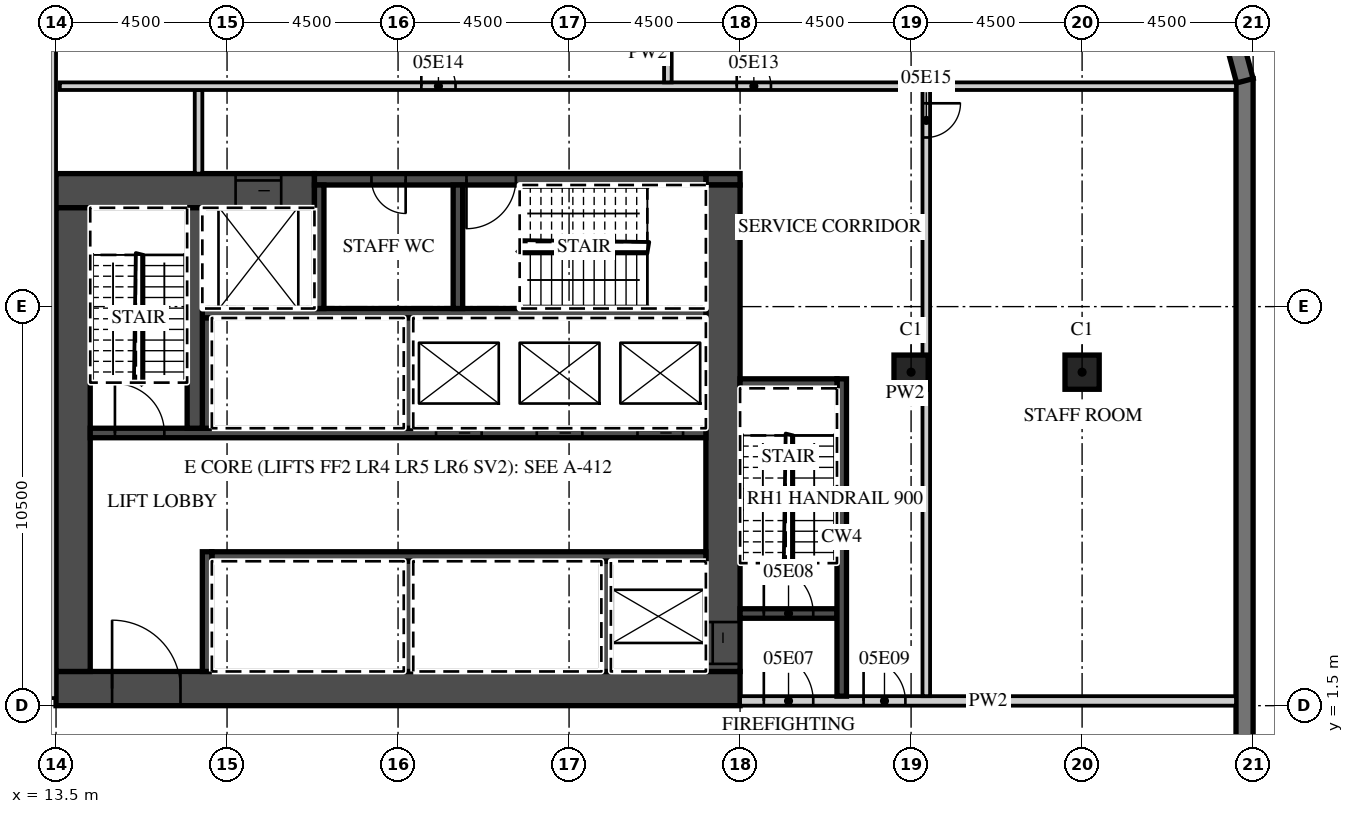
"""IFC4 building model, lengths in metres.
Left out: names, types, materials, properties, quantities, classifications, styles, units other than length and angle.
Written with IfcOpenShell. Run it as: python <this file> out.ifc"""

import sys

from ifc_helpers import new_model, si_unit, direction, frame, frame_2d, origin, origin_2d, place, context, subcontext, project, spatial, polyline, rectangle, outline, extrude, element, fill, save


model = new_model("IFC4")
c1 = context("Model", 3, precision=1e-05, world=origin(), true_north=direction((0.0, 1.0)))
c2 = subcontext(c1, "Body", "Model", "MODEL_VIEW")
j1 = project(units=[si_unit("LENGTHUNIT", "METRE"), si_unit("PLANEANGLEUNIT", "RADIAN")], contexts=[c1])
p1 = place(None, origin())
s1 = spatial("IfcSite", under=j1, at=p1, CompositionType="ELEMENT")
p2 = place(p1, origin())
s2 = spatial("IfcBuilding", under=s1, at=p2, CompositionType="ELEMENT")
p3 = place(p2, frame((0.0, 0.0, 33.5)))
s3 = spatial("IfcBuildingStorey", under=s2, at=p3, CompositionType="ELEMENT", Elevation=33.5)
for number, where, z_axis, x_axis in (
    (1, (36.0, 10.275, 0.0), (0.0, 0.0, 1.0), (1.0, 0.0, 0.0)),
    (2, (40.5, 10.275, 0.0), (0.0, 0.0, 1.0), (1.0, 0.0, 0.0)),
):
    element("IfcColumn", number, at=place(p3, frame(where, z_axis=z_axis, x_axis=x_axis)), inside=s3, PredefinedType="COLUMN", context=c2, shape_type="SweptSolid", body=[
        extrude(rectangle(XDim=0.9, YDim=0.9, at=origin_2d()), origin(), (0.0, 0.0, 1.0), 4.5),
    ])
p4 = place(p3, frame((44.775, -18.0, 0.0), z_axis=(0.0, 0.0, 1.0), x_axis=(0.0, 1.0, 0.0)))
e3 = element("IfcWall", 3, at=p4, inside=s3, PredefinedType="SOLIDWALL", context=c2, shape_type="SweptSolid", body=[
    extrude(rectangle(XDim=36.0, YDim=0.45, at=frame_2d((18.0, 0.0))), origin(), (0.0, 0.0, 1.0), 4.05),
])
p5 = place(p4, frame((4.05, 0.0, 0.9)))
e4 = element("IfcOpeningElement", 4, at=p5, cuts=e3, PredefinedType="OPENING", context=c2, shape_type="SweptSolid", body=[
    extrude(rectangle(XDim=3.0, YDim=1.8, at=frame_2d((1.5, 0.9))), frame((0.0, 0.235, 0.0), z_axis=(0.0, -1.0, 0.0), x_axis=(1.0, 0.0, 0.0)), (0.0, 0.0, 1.0), 0.47),
])
p6 = place(p3, frame((44.783, 17.942, 0.0), z_axis=(0.0, 0.0, 1.0), x_axis=(-0.25881466832, 0.965926999034, 0.0)))
e5 = element("IfcWall", 5, at=p6, inside=s3, PredefinedType="SOLIDWALL", context=c2, shape_type="SweptSolid", body=[
    extrude(outline(polyline([(0.0, -0.225), (2.071, -0.225), (1.95, 0.225), (0.121, 0.225), (0.0, -0.225)])), origin(), (0.0, 0.0, 1.0), 4.05),
])
p7 = place(p3, frame((13.5, 1.95, 0.0), z_axis=(0.0, 0.0, 1.0), x_axis=(1.0, 0.0, 0.0)))
e6 = element("IfcWall", 6, at=p7, inside=s3, PredefinedType="SHEAR", context=c2, shape_type="SweptSolid", body=[
    extrude(rectangle(XDim=18.0, YDim=0.9, at=frame_2d((9.0, 0.0))), origin(), (0.0, 0.0, 1.0), 4.05),
])
p8 = place(p7, frame((1.475, 0.0, 0.0)))
e7 = element("IfcOpeningElement", 7, at=p8, cuts=e6, PredefinedType="OPENING", context=c2, shape_type="SweptSolid", body=[
    extrude(rectangle(XDim=1.8, YDim=2.1, at=frame_2d((0.9, 1.05))), frame((0.0, 0.46, 0.0), z_axis=(0.0, -1.0, 0.0), x_axis=(1.0, 0.0, 0.0)), (0.0, 0.0, 1.0), 0.92),
])
p9 = place(p3, frame((13.5, 15.05, 0.0), z_axis=(0.0, 0.0, 1.0), x_axis=(1.0, 0.0, 0.0)))
e8 = element("IfcWall", 8, at=p9, inside=s3, PredefinedType="SHEAR", context=c2, shape_type="SweptSolid", body=[
    extrude(rectangle(XDim=6.8, YDim=0.9, at=frame_2d((3.4, 0.0))), origin(), (0.0, 0.0, 1.0), 4.05),
])
p10 = place(p9, frame((4.725, 0.0, 0.0)))
e9 = element("IfcOpeningElement", 9, at=p10, cuts=e8, PredefinedType="OPENING", context=c2, shape_type="SweptSolid", body=[
    extrude(rectangle(XDim=1.2, YDim=2.1, at=frame_2d((0.6, 1.05))), frame((0.0, 0.46, 0.0), z_axis=(0.0, -1.0, 0.0), x_axis=(1.0, 0.0, 0.0)), (0.0, 0.0, 1.0), 0.92),
])
p11 = place(p3, frame((30.6, 15.35, 0.0), z_axis=(0.0, 0.0, 1.0), x_axis=(1.0, 0.0, 0.0)))
e10 = element("IfcWall", 10, at=p11, inside=s3, PredefinedType="SHEAR", context=c2, shape_type="SweptSolid", body=[
    extrude(rectangle(XDim=0.9, YDim=0.3, at=frame_2d((0.45, 0.0))), origin(), (0.0, 0.0, 1.0), 4.05),
])
p12 = place(p3, frame((20.3, 15.35, 0.0), z_axis=(0.0, 0.0, 1.0), x_axis=(1.0, 0.0, 0.0)))
e11 = element("IfcWall", 11, at=p12, inside=s3, PredefinedType="SHEAR", context=c2, shape_type="SweptSolid", body=[
    extrude(rectangle(XDim=10.3, YDim=0.3, at=frame_2d((5.15, 0.0))), origin(), (0.0, 0.0, 1.0), 4.05),
])
p13 = place(p12, frame((4.0, 0.0, 0.0)))
e12 = element("IfcOpeningElement", 12, at=p13, cuts=e11, PredefinedType="OPENING", context=c2, shape_type="SweptSolid", body=[
    extrude(rectangle(XDim=1.3, YDim=2.1, at=frame_2d((0.65, 1.05))), frame((0.0, 0.16, 0.0), z_axis=(0.0, -1.0, 0.0), x_axis=(1.0, 0.0, 0.0)), (0.0, 0.0, 1.0), 0.32),
])
p14 = place(p12, frame((1.5, 0.0, 0.0)))
e13 = element("IfcOpeningElement", 13, at=p14, cuts=e11, PredefinedType="OPENING", context=c2, shape_type="SweptSolid", body=[
    extrude(rectangle(XDim=0.9, YDim=2.1, at=frame_2d((0.45, 1.05))), frame((0.0, 0.16, 0.0), z_axis=(0.0, -1.0, 0.0), x_axis=(1.0, 0.0, 0.0)), (0.0, 0.0, 1.0), 0.32),
])
p15 = place(p3, frame((31.05, 2.4, 0.0), z_axis=(0.0, 0.0, 1.0), x_axis=(0.0, 1.0, 0.0)))
e14 = element("IfcWall", 14, at=p15, inside=s3, PredefinedType="SHEAR", context=c2, shape_type="SweptSolid", body=[
    extrude(rectangle(XDim=12.8, YDim=0.9, at=frame_2d((6.4, 0.0))), origin(), (0.0, 0.0, 1.0), 4.05),
])
p16 = place(p15, frame((0.2, 0.0, 0.0)))
e15 = element("IfcOpeningElement", 15, at=p16, cuts=e14, PredefinedType="OPENING", context=c2, shape_type="SweptSolid", body=[
    extrude(rectangle(XDim=1.1, YDim=2.1, at=frame_2d((0.55, 1.05))), frame((0.0, 0.46, 0.0), z_axis=(0.0, -1.0, 0.0), x_axis=(1.0, 0.0, 0.0)), (0.0, 0.0, 1.0), 0.92),
])
p17 = place(p3, frame((13.95, 2.4, 0.0), z_axis=(0.0, 0.0, 1.0), x_axis=(0.0, 1.0, 0.0)))
e16 = element("IfcWall", 16, at=p17, inside=s3, PredefinedType="SHEAR", context=c2, shape_type="SweptSolid", body=[
    extrude(rectangle(XDim=12.2, YDim=0.9, at=frame_2d((6.1, 0.0))), origin(), (0.0, 0.0, 1.0), 4.05),
])
p18 = place(p3, frame((17.6, 5.425, 0.0), z_axis=(0.0, 0.0, 1.0), x_axis=(1.0, 0.0, 0.0)))
e17 = element("IfcWall", 17, at=p18, inside=s3, PredefinedType="SHEAR", context=c2, shape_type="SweptSolid", body=[
    extrude(rectangle(XDim=13.0, YDim=0.25, at=frame_2d((6.5, 0.0))), origin(), (0.0, 0.0, 1.0), 4.05),
])
p19 = place(p3, frame((17.475, 2.4, 0.0), z_axis=(0.0, 0.0, 1.0), x_axis=(0.0, 1.0, 0.0)))
e18 = element("IfcWall", 18, at=p19, inside=s3, PredefinedType="SHEAR", context=c2, shape_type="SweptSolid", body=[
    extrude(rectangle(XDim=3.15, YDim=0.25, at=frame_2d((1.575, 0.0))), origin(), (0.0, 0.0, 1.0), 4.05),
])
for number, where, z_axis, x_axis in (
    (19, (27.975, 2.4, 0.0), (0.0, 0.0, 1.0), (0.0, 1.0, 0.0)),
    (20, (22.775, 2.4, 0.0), (0.0, 0.0, 1.0), (0.0, 1.0, 0.0)),
):
    element("IfcWall", number, at=place(p3, frame(where, z_axis=z_axis, x_axis=x_axis)), inside=s3, PredefinedType="SHEAR", context=c2, shape_type="SweptSolid", body=[
        extrude(rectangle(XDim=2.9, YDim=0.25, at=frame_2d((1.45, 0.0))), origin(), (0.0, 0.0, 1.0), 4.05),
    ])
p20 = place(p3, frame((14.4, 8.675, 0.0), z_axis=(0.0, 0.0, 1.0), x_axis=(1.0, 0.0, 0.0)))
e21 = element("IfcWall", 21, at=p20, inside=s3, PredefinedType="SHEAR", context=c2, shape_type="SweptSolid", body=[
    extrude(rectangle(XDim=16.2, YDim=0.25, at=frame_2d((8.1, 0.0))), origin(), (0.0, 0.0, 1.0), 4.05),
])
p21 = place(p20, frame((14.4, 0.0, 0.0)))
e22 = element("IfcOpeningElement", 22, at=p21, cuts=e21, PredefinedType="OPENING", context=c2, shape_type="SweptSolid", body=[
    extrude(rectangle(XDim=1.2, YDim=2.1, at=frame_2d((0.6, 1.05))), frame((0.0, 0.135, 0.0), z_axis=(0.0, -1.0, 0.0), x_axis=(1.0, 0.0, 0.0)), (0.0, 0.0, 1.0), 0.27),
])
p22 = place(p20, frame((11.75, 0.0, 0.0)))
e23 = element("IfcOpeningElement", 23, at=p22, cuts=e21, PredefinedType="OPENING", context=c2, shape_type="SweptSolid", body=[
    extrude(rectangle(XDim=1.2, YDim=2.1, at=frame_2d((0.6, 1.05))), frame((0.0, 0.135, 0.0), z_axis=(0.0, -1.0, 0.0), x_axis=(1.0, 0.0, 0.0)), (0.0, 0.0, 1.0), 0.27),
])
p23 = place(p20, frame((9.1, 0.0, 0.0)))
e24 = element("IfcOpeningElement", 24, at=p23, cuts=e21, PredefinedType="OPENING", context=c2, shape_type="SweptSolid", body=[
    extrude(rectangle(XDim=1.2, YDim=2.1, at=frame_2d((0.6, 1.05))), frame((0.0, 0.135, 0.0), z_axis=(0.0, -1.0, 0.0), x_axis=(1.0, 0.0, 0.0)), (0.0, 0.0, 1.0), 0.27),
])
p24 = place(p20, frame((0.65, 0.0, 0.0)))
e25 = element("IfcOpeningElement", 25, at=p24, cuts=e21, PredefinedType="OPENING", context=c2, shape_type="SweptSolid", body=[
    extrude(rectangle(XDim=1.3, YDim=2.1, at=frame_2d((0.65, 1.05))), frame((0.0, 0.135, 0.0), z_axis=(0.0, -1.0, 0.0), x_axis=(1.0, 0.0, 0.0)), (0.0, 0.0, 1.0), 0.27),
])
p25 = place(p3, frame((17.35, 11.825, 0.0), z_axis=(0.0, 0.0, 1.0), x_axis=(1.0, 0.0, 0.0)))
e26 = element("IfcWall", 26, at=p25, inside=s3, PredefinedType="SHEAR", context=c2, shape_type="SweptSolid", body=[
    extrude(rectangle(XDim=13.25, YDim=0.25, at=frame_2d((6.625, 0.0))), origin(), (0.0, 0.0, 1.0), 4.05),
])
for number, where, z_axis, x_axis in (
    (27, (17.475, 8.8, 0.0), (0.0, 0.0, 1.0), (0.0, 1.0, 0.0)),
    (28, (22.775, 8.8, 0.0), (0.0, 0.0, 1.0), (0.0, 1.0, 0.0)),
):
    element("IfcWall", number, at=place(p3, frame(where, z_axis=z_axis, x_axis=x_axis)), inside=s3, PredefinedType="SHEAR", context=c2, shape_type="SweptSolid", body=[
        extrude(rectangle(XDim=2.9, YDim=0.25, at=frame_2d((1.45, 0.0))), origin(), (0.0, 0.0, 1.0), 4.05),
    ])
p26 = place(p3, frame((17.15, 8.8, 0.0), z_axis=(0.0, 0.0, 1.0), x_axis=(0.0, 1.0, 0.0)))
e29 = element("IfcWall", 29, at=p26, inside=s3, PredefinedType="SHEAR", context=c2, shape_type="SweptSolid", body=[
    extrude(rectangle(XDim=5.8, YDim=0.4, at=frame_2d((2.9, 0.0))), origin(), (0.0, 0.0, 1.0), 4.05),
])
for number, where, z_axis, x_axis in (
    (30, (20.425, 11.95, 0.0), (0.0, 0.0, 1.0), (0.0, 1.0, 0.0)),
    (31, (24.075, 11.95, 0.0), (0.0, 0.0, 1.0), (0.0, 1.0, 0.0)),
):
    element("IfcWall", number, at=place(p3, frame(where, z_axis=z_axis, x_axis=x_axis)), inside=s3, PredefinedType="SHEAR", context=c2, shape_type="SweptSolid", body=[
        extrude(rectangle(XDim=3.25, YDim=0.25, at=frame_2d((1.625, 0.0))), origin(), (0.0, 0.0, 1.0), 4.05),
    ])
p27 = place(p3, frame((31.5, 1.625, 0.0), z_axis=(0.0, 0.0, 1.0), x_axis=(1.0, 0.0, 0.0)))
e32 = element("IfcWall", 32, at=p27, inside=s3, PredefinedType="PARTITIONING", context=c2, shape_type="SweptSolid", body=[
    extrude(rectangle(XDim=13.05, YDim=0.25, at=frame_2d((6.525, 0.0))), origin(), (0.0, 0.0, 1.0), 4.05),
])
p28 = place(p27, frame((0.625, 0.0, 0.0)))
e33 = element("IfcOpeningElement", 33, at=p28, cuts=e32, PredefinedType="OPENING", context=c2, shape_type="SweptSolid", body=[
    extrude(rectangle(XDim=1.3, YDim=2.1, at=frame_2d((0.65, 1.05))), frame((0.0, 0.135, 0.0), z_axis=(0.0, -1.0, 0.0), x_axis=(1.0, 0.0, 0.0)), (0.0, 0.0, 1.0), 0.27),
])
p29 = place(p27, frame((3.25, 0.0, 0.0)))
e34 = element("IfcOpeningElement", 34, at=p29, cuts=e32, PredefinedType="OPENING", context=c2, shape_type="SweptSolid", body=[
    extrude(rectangle(XDim=1.1, YDim=2.1, at=frame_2d((0.55, 1.05))), frame((0.0, 0.135, 0.0), z_axis=(0.0, -1.0, 0.0), x_axis=(1.0, 0.0, 0.0)), (0.0, 0.0, 1.0), 0.27),
])
p30 = place(p3, frame((31.5, 3.925, 0.0), z_axis=(0.0, 0.0, 1.0), x_axis=(1.0, 0.0, 0.0)))
e35 = element("IfcWall", 35, at=p30, inside=s3, PredefinedType="SHEAR", context=c2, shape_type="SweptSolid", body=[
    extrude(rectangle(XDim=2.55, YDim=0.25, at=frame_2d((1.275, 0.0))), origin(), (0.0, 0.0, 1.0), 4.05),
])
p31 = place(p30, frame((0.625, 0.0, 0.0)))
e36 = element("IfcOpeningElement", 36, at=p31, cuts=e35, PredefinedType="OPENING", context=c2, shape_type="SweptSolid", body=[
    extrude(rectangle(XDim=1.3, YDim=2.1, at=frame_2d((0.65, 1.05))), frame((0.0, 0.135, 0.0), z_axis=(0.0, -1.0, 0.0), x_axis=(1.0, 0.0, 0.0)), (0.0, 0.0, 1.0), 0.27),
])
p32 = place(p3, frame((34.175, 1.75, 0.0), z_axis=(0.0, 0.0, 1.0), x_axis=(0.0, 1.0, 0.0)))
e37 = element("IfcWall", 37, at=p32, inside=s3, PredefinedType="SHEAR", context=c2, shape_type="SweptSolid", body=[
    extrude(rectangle(XDim=8.35, YDim=0.25, at=frame_2d((4.175, 0.0))), origin(), (0.0, 0.0, 1.0), 4.05),
])
p33 = place(p3, frame((31.5, 9.975, 0.0), z_axis=(0.0, 0.0, 1.0), x_axis=(1.0, 0.0, 0.0)))
e38 = element("IfcWall", 38, at=p33, inside=s3, PredefinedType="SHEAR", context=c2, shape_type="SweptSolid", body=[
    extrude(rectangle(XDim=2.55, YDim=0.25, at=frame_2d((1.275, 0.0))), origin(), (0.0, 0.0, 1.0), 4.05),
])
p34 = place(p3, frame((17.25, 15.5, 0.0), z_axis=(0.0, 0.0, 1.0), x_axis=(0.0, 1.0, 0.0)))
e39 = element("IfcWall", 39, at=p34, inside=s3, PredefinedType="PARTITIONING", context=c2, shape_type="SweptSolid", body=[
    extrude(rectangle(XDim=2.2, YDim=0.2, at=frame_2d((1.1, 0.0))), origin(), (0.0, 0.0, 1.0), 4.05),
])
p35 = place(p3, frame((36.4, 1.75, 0.0), z_axis=(0.0, 0.0, 1.0), x_axis=(0.0, 1.0, 0.0)))
e40 = element("IfcWall", 40, at=p35, inside=s3, PredefinedType="PARTITIONING", context=c2, shape_type="SweptSolid", body=[
    extrude(rectangle(XDim=15.95, YDim=0.2, at=frame_2d((7.975, 0.0))), origin(), (0.0, 0.0, 1.0), 4.05),
])
p36 = place(p35, frame((14.7, 0.0, 0.0)))
e41 = element("IfcOpeningElement", 41, at=p36, cuts=e40, PredefinedType="OPENING", context=c2, shape_type="SweptSolid", body=[
    extrude(rectangle(XDim=0.9, YDim=2.1, at=frame_2d((0.45, 1.05))), frame((0.0, 0.11, 0.0), z_axis=(0.0, -1.0, 0.0), x_axis=(1.0, 0.0, 0.0)), (0.0, 0.0, 1.0), 0.22),
])
p37 = place(p3, frame((13.6, 17.8, 0.0), z_axis=(0.0, 0.0, 1.0), x_axis=(1.0, 0.0, 0.0)))
e42 = element("IfcWall", 42, at=p37, inside=s3, PredefinedType="PARTITIONING", context=c2, shape_type="SweptSolid", body=[
    extrude(rectangle(XDim=30.95, YDim=0.2, at=frame_2d((15.475, 0.0))), origin(), (0.0, 0.0, 1.0), 4.05),
])
p38 = place(p37, frame((17.812, 0.0, 0.0)))
e43 = element("IfcOpeningElement", 43, at=p38, cuts=e42, PredefinedType="OPENING", context=c2, shape_type="SweptSolid", body=[
    extrude(rectangle(XDim=0.9, YDim=2.1, at=frame_2d((0.45, 1.05))), frame((0.0, 0.11, 0.0), z_axis=(0.0, -1.0, 0.0), x_axis=(1.0, 0.0, 0.0)), (0.0, 0.0, 1.0), 0.22),
])
p39 = place(p37, frame((9.512, 0.0, 0.0)))
e44 = element("IfcOpeningElement", 44, at=p39, cuts=e42, PredefinedType="OPENING", context=c2, shape_type="SweptSolid", body=[
    extrude(rectangle(XDim=0.9, YDim=2.1, at=frame_2d((0.45, 1.05))), frame((0.0, 0.11, 0.0), z_axis=(0.0, -1.0, 0.0), x_axis=(1.0, 0.0, 0.0)), (0.0, 0.0, 1.0), 0.22),
])
p40 = place(p3, frame((29.6, 17.9, 0.0), z_axis=(0.0, 0.0, 1.0), x_axis=(0.0, 1.0, 0.0)))
e45 = element("IfcWall", 45, at=p40, inside=s3, PredefinedType="PARTITIONING", context=c2, shape_type="SweptSolid", body=[
    extrude(rectangle(XDim=3.65, YDim=0.2, at=frame_2d((1.825, 0.0))), origin(), (0.0, 0.0, 1.0), 4.05),
])
p41 = place(p3, frame((13.4, 1.7, 0.0), z_axis=(0.0, 0.0, 1.0), x_axis=(0.0, 1.0, 0.0)))
e46 = element("IfcWall", 46, at=p41, inside=s3, PredefinedType="PARTITIONING", context=c2, shape_type="SweptSolid", body=[
    extrude(rectangle(XDim=20.15, YDim=0.2, at=frame_2d((10.075, 0.0))), origin(), (0.0, 0.0, 1.0), 4.05),
])
p42 = place(p21, origin())
e47 = element("IfcDoor", 47, at=p42, inside=s3, OperationType="SLIDING_TO_LEFT", PredefinedType="DOOR", context=c2, shape_type="SweptSolid", body=[
    extrude(rectangle(XDim=1.2, YDim=2.1, at=frame_2d((0.6, 1.05))), frame((0.0, 0.025, 0.0), z_axis=(0.0, -1.0, 0.0), x_axis=(1.0, 0.0, 0.0)), (0.0, 0.0, 1.0), 0.05),
])
fill(e22, e47)
p43 = place(p22, origin())
e48 = element("IfcDoor", 48, at=p43, inside=s3, OperationType="SLIDING_TO_RIGHT", PredefinedType="DOOR", context=c2, shape_type="SweptSolid", body=[
    extrude(rectangle(XDim=1.2, YDim=2.1, at=frame_2d((0.6, 1.05))), frame((0.0, 0.025, 0.0), z_axis=(0.0, -1.0, 0.0), x_axis=(1.0, 0.0, 0.0)), (0.0, 0.0, 1.0), 0.05),
])
fill(e23, e48)
p44 = place(p23, origin())
e49 = element("IfcDoor", 49, at=p44, inside=s3, OperationType="SLIDING_TO_RIGHT", PredefinedType="DOOR", context=c2, shape_type="SweptSolid", body=[
    extrude(rectangle(XDim=1.2, YDim=2.1, at=frame_2d((0.6, 1.05))), frame((0.0, 0.025, 0.0), z_axis=(0.0, -1.0, 0.0), x_axis=(1.0, 0.0, 0.0)), (0.0, 0.0, 1.0), 0.05),
])
fill(e24, e49)
p45 = place(p10, origin())
e50 = element("IfcDoor", 50, at=p45, inside=s3, OperationType="SLIDING_TO_LEFT", PredefinedType="DOOR", context=c2, shape_type="SweptSolid", body=[
    extrude(rectangle(XDim=1.2, YDim=2.1, at=frame_2d((0.6, 1.05))), frame((0.0, 0.025, 0.0), z_axis=(0.0, -1.0, 0.0), x_axis=(1.0, 0.0, 0.0)), (0.0, 0.0, 1.0), 0.05),
])
fill(e9, e50)
p46 = place(p16, origin())
e51 = element("IfcDoor", 51, at=p46, inside=s3, OperationType="SLIDING_TO_LEFT", PredefinedType="DOOR", context=c2, shape_type="SweptSolid", body=[
    extrude(rectangle(XDim=1.1, YDim=2.1, at=frame_2d((0.55, 1.05))), frame((0.0, 0.025, 0.0), z_axis=(0.0, -1.0, 0.0), x_axis=(1.0, 0.0, 0.0)), (0.0, 0.0, 1.0), 0.05),
])
fill(e15, e51)
p47 = place(p8, origin())
e52 = element("IfcDoor", 52, at=p47, inside=s3, OperationType="DOUBLE_DOOR_DOUBLE_SWING", PredefinedType="DOOR", context=c2, shape_type="SweptSolid", body=[
    extrude(rectangle(XDim=1.8, YDim=2.1, at=frame_2d((0.9, 1.05))), frame((0.0, 0.025, 0.0), z_axis=(0.0, -1.0, 0.0), x_axis=(1.0, 0.0, 0.0)), (0.0, 0.0, 1.0), 0.05),
])
fill(e7, e52)
p48 = place(p28, origin())
e53 = element("IfcDoor", 53, at=p48, inside=s3, OperationType="SINGLE_SWING_LEFT", PredefinedType="DOOR", context=c2, shape_type="SweptSolid", body=[
    extrude(rectangle(XDim=1.3, YDim=2.1, at=frame_2d((0.65, 1.05))), frame((0.0, 0.025, 0.0), z_axis=(0.0, -1.0, 0.0), x_axis=(1.0, 0.0, 0.0)), (0.0, 0.0, 1.0), 0.05),
])
fill(e33, e53)
p49 = place(p31, origin())
e54 = element("IfcDoor", 54, at=p49, inside=s3, OperationType="SINGLE_SWING_LEFT", PredefinedType="DOOR", context=c2, shape_type="SweptSolid", body=[
    extrude(rectangle(XDim=1.3, YDim=2.1, at=frame_2d((0.65, 1.05))), frame((0.0, 0.025, 0.0), z_axis=(0.0, -1.0, 0.0), x_axis=(1.0, 0.0, 0.0)), (0.0, 0.0, 1.0), 0.05),
])
fill(e36, e54)
p50 = place(p29, origin())
e55 = element("IfcDoor", 55, at=p50, inside=s3, OperationType="SINGLE_SWING_LEFT", PredefinedType="DOOR", context=c2, shape_type="SweptSolid", body=[
    extrude(rectangle(XDim=1.1, YDim=2.1, at=frame_2d((0.55, 1.05))), frame((0.0, 0.025, 0.0), z_axis=(0.0, -1.0, 0.0), x_axis=(1.0, 0.0, 0.0)), (0.0, 0.0, 1.0), 0.05),
])
fill(e34, e55)
p51 = place(p24, origin())
e56 = element("IfcDoor", 56, at=p51, inside=s3, OperationType="SINGLE_SWING_LEFT", PredefinedType="DOOR", context=c2, shape_type="SweptSolid", body=[
    extrude(rectangle(XDim=1.3, YDim=2.1, at=frame_2d((0.65, 1.05))), frame((0.0, 0.025, 0.0), z_axis=(0.0, -1.0, 0.0), x_axis=(1.0, 0.0, 0.0)), (0.0, 0.0, 1.0), 0.05),
])
fill(e25, e56)
p52 = place(p13, origin())
e57 = element("IfcDoor", 57, at=p52, inside=s3, OperationType="SINGLE_SWING_LEFT", PredefinedType="DOOR", context=c2, shape_type="SweptSolid", body=[
    extrude(rectangle(XDim=1.3, YDim=2.1, at=frame_2d((0.65, 1.05))), frame((0.0, 0.025, 0.0), z_axis=(0.0, -1.0, 0.0), x_axis=(1.0, 0.0, 0.0)), (0.0, 0.0, 1.0), 0.05),
])
fill(e12, e57)
p53 = place(p14, origin())
e58 = element("IfcDoor", 58, at=p53, inside=s3, OperationType="SINGLE_SWING_RIGHT", PredefinedType="DOOR", context=c2, shape_type="SweptSolid", body=[
    extrude(rectangle(XDim=0.9, YDim=2.1, at=frame_2d((0.45, 1.05))), frame((0.0, 0.025, 0.0), z_axis=(0.0, -1.0, 0.0), x_axis=(1.0, 0.0, 0.0)), (0.0, 0.0, 1.0), 0.05),
])
fill(e13, e58)
p54 = place(p38, origin())
e59 = element("IfcDoor", 59, at=p54, inside=s3, OperationType="SINGLE_SWING_LEFT", PredefinedType="DOOR", context=c2, shape_type="SweptSolid", body=[
    extrude(rectangle(XDim=0.9, YDim=2.1, at=frame_2d((0.45, 1.05))), frame((0.0, 0.025, 0.0), z_axis=(0.0, -1.0, 0.0), x_axis=(1.0, 0.0, 0.0)), (0.0, 0.0, 1.0), 0.05),
])
fill(e43, e59)
p55 = place(p39, origin())
e60 = element("IfcDoor", 60, at=p55, inside=s3, OperationType="SINGLE_SWING_LEFT", PredefinedType="DOOR", context=c2, shape_type="SweptSolid", body=[
    extrude(rectangle(XDim=0.9, YDim=2.1, at=frame_2d((0.45, 1.05))), frame((0.0, 0.025, 0.0), z_axis=(0.0, -1.0, 0.0), x_axis=(1.0, 0.0, 0.0)), (0.0, 0.0, 1.0), 0.05),
])
fill(e44, e60)
p56 = place(p36, origin())
e61 = element("IfcDoor", 61, at=p56, inside=s3, OperationType="SINGLE_SWING_RIGHT", PredefinedType="DOOR", context=c2, shape_type="SweptSolid", body=[
    extrude(rectangle(XDim=0.9, YDim=2.1, at=frame_2d((0.45, 1.05))), frame((0.0, 0.025, 0.0), z_axis=(0.0, -1.0, 0.0), x_axis=(1.0, 0.0, 0.0)), (0.0, 0.0, 1.0), 0.05),
])
fill(e41, e61)
save(model, sys.argv[1])
